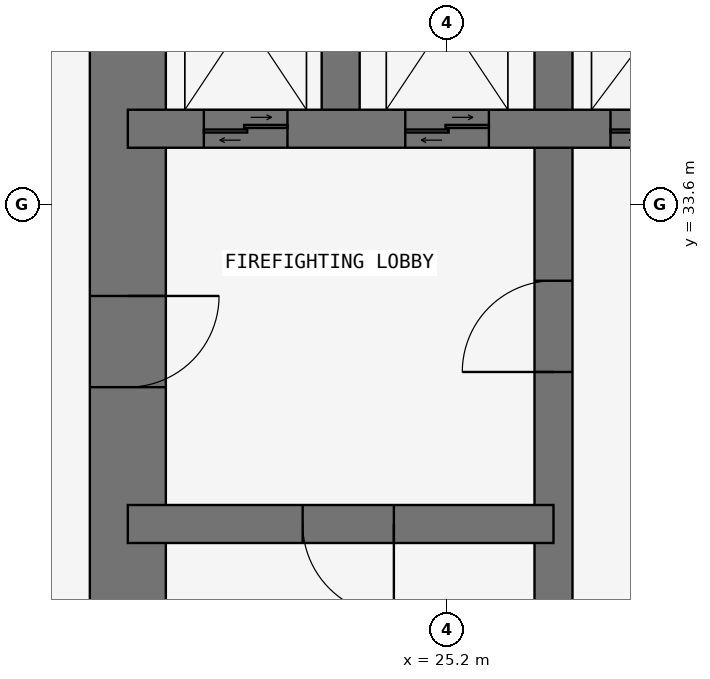
"""IFC4 building model, lengths in metres.
Left out: names, types, materials, properties, quantities, classifications, styles, units other than length and angle.
Written with IfcOpenShell. Run it as: python <this file> out.ifc"""

import sys

from ifc_helpers import new_model, si_unit, direction, frame, frame_2d, origin, place, context, subcontext, project, spatial, rectangle, extrude, element, fill, save


model = new_model("IFC4")
c1 = context("Model", 3, precision=1e-05, world=origin(), true_north=direction((0.0, 1.0)))
c2 = subcontext(c1, "Body", "Model", "MODEL_VIEW")
j1 = project(units=[si_unit("LENGTHUNIT", "METRE"), si_unit("PLANEANGLEUNIT", "RADIAN")], contexts=[c1])
p1 = place(None, origin())
s1 = spatial("IfcSite", under=j1, at=p1, CompositionType="ELEMENT")
p2 = place(p1, origin())
s2 = spatial("IfcBuilding", under=s1, at=p2, CompositionType="ELEMENT")
p3 = place(p2, frame((0.0, 0.0, 45.3)))
s3 = spatial("IfcBuildingStorey", under=s2, at=p3, CompositionType="ELEMENT", Elevation=45.3)
p4 = place(p3, frame((21.0, 37.8, 0.0), z_axis=(0.0, 0.0, 1.0), x_axis=(0.0, -1.0, 0.0)))
e1 = element("IfcWall", 1, at=p4, inside=s3, PredefinedType="SHEAR", context=c2, shape_type="SweptSolid", body=[
    extrude(rectangle(XDim=17.3, YDim=1.0, at=frame_2d((8.65, 0.0))), origin(), (0.0, 0.0, 1.0), 3.6),
])
p5 = place(p4, frame((5.4, 0.0, 0.0)))
e2 = element("IfcOpeningElement", 2, at=p5, cuts=e1, PredefinedType="OPENING", context=c2, shape_type="SweptSolid", body=[
    extrude(rectangle(XDim=1.2, YDim=2.1, at=frame_2d((0.6, 1.05))), frame((0.0, 0.51, 0.0), z_axis=(0.0, -1.0, 0.0), x_axis=(1.0, 0.0, 0.0)), (0.0, 0.0, 1.0), 1.02),
])
p6 = place(p3, frame((26.6, 21.0, 0.0), z_axis=(0.0, 0.0, 1.0), x_axis=(0.0, 1.0, 0.0)))
e3 = element("IfcWall", 3, at=p6, inside=s3, PredefinedType="SHEAR", context=c2, shape_type="SweptSolid", body=[
    extrude(rectangle(XDim=16.8, YDim=0.5, at=frame_2d((8.4, 0.0))), origin(), (0.0, 0.0, 1.0), 3.6),
])
p7 = place(p6, frame((10.4, 0.0, 0.0)))
e4 = element("IfcOpeningElement", 4, at=p7, cuts=e3, PredefinedType="OPENING", context=c2, shape_type="SweptSolid", body=[
    extrude(rectangle(XDim=1.2, YDim=2.1, at=frame_2d((0.6, 1.05))), frame((0.0, 0.26, 0.0), z_axis=(0.0, -1.0, 0.0), x_axis=(1.0, 0.0, 0.0)), (0.0, 0.0, 1.0), 0.52),
])
p8 = place(p3, frame((21.0, 29.4, 0.0), z_axis=(0.0, 0.0, 1.0), x_axis=(1.0, 0.0, 0.0)))
e5 = element("IfcWall", 5, at=p8, inside=s3, PredefinedType="SHEAR", context=c2, shape_type="SweptSolid", body=[
    extrude(rectangle(XDim=5.6, YDim=0.5, at=frame_2d((2.8, 0.0))), origin(), (0.0, 0.0, 1.0), 3.6),
])
p9 = place(p8, frame((2.3, 0.0, 0.0)))
e6 = element("IfcOpeningElement", 6, at=p9, cuts=e5, PredefinedType="OPENING", context=c2, shape_type="SweptSolid", body=[
    extrude(rectangle(XDim=1.2, YDim=2.1, at=frame_2d((0.6, 1.05))), frame((0.0, 0.26, 0.0), z_axis=(0.0, -1.0, 0.0), x_axis=(1.0, 0.0, 0.0)), (0.0, 0.0, 1.0), 0.52),
])
p10 = place(p3, frame((21.0, 34.6, 0.0), z_axis=(0.0, 0.0, 1.0), x_axis=(1.0, 0.0, 0.0)))
e7 = element("IfcWall", 7, at=p10, inside=s3, PredefinedType="SHEAR", context=c2, shape_type="SweptSolid", body=[
    extrude(rectangle(XDim=11.2, YDim=0.5, at=frame_2d((5.6, 0.0))), origin(), (0.0, 0.0, 1.0), 3.6),
])
p11 = place(p10, frame((9.35, 0.0, 0.0)))
e8 = element("IfcOpeningElement", 8, at=p11, cuts=e7, PredefinedType="OPENING", context=c2, shape_type="SweptSolid", body=[
    extrude(rectangle(XDim=0.9, YDim=2.1, at=frame_2d((0.45, 1.05))), frame((0.0, 0.26, 0.0), z_axis=(0.0, -1.0, 0.0), x_axis=(1.0, 0.0, 0.0)), (0.0, 0.0, 1.0), 0.52),
])
p12 = place(p10, frame((1.0, 0.0, 0.0)))
e9 = element("IfcOpeningElement", 9, at=p12, cuts=e7, PredefinedType="OPENING", context=c2, shape_type="SweptSolid", body=[
    extrude(rectangle(XDim=1.1, YDim=2.1, at=frame_2d((0.55, 1.05))), frame((0.0, 0.26, 0.0), z_axis=(0.0, -1.0, 0.0), x_axis=(1.0, 0.0, 0.0)), (0.0, 0.0, 1.0), 0.52),
])
p13 = place(p10, frame((3.65, 0.0, 0.0)))
e10 = element("IfcOpeningElement", 10, at=p13, cuts=e7, PredefinedType="OPENING", context=c2, shape_type="SweptSolid", body=[
    extrude(rectangle(XDim=1.1, YDim=2.1, at=frame_2d((0.55, 1.05))), frame((0.0, 0.26, 0.0), z_axis=(0.0, -1.0, 0.0), x_axis=(1.0, 0.0, 0.0)), (0.0, 0.0, 1.0), 0.52),
])
p14 = place(p10, frame((6.35, 0.0, 0.0)))
e11 = element("IfcOpeningElement", 11, at=p14, cuts=e7, PredefinedType="OPENING", context=c2, shape_type="SweptSolid", body=[
    extrude(rectangle(XDim=1.3, YDim=2.1, at=frame_2d((0.65, 1.05))), frame((0.0, 0.26, 0.0), z_axis=(0.0, -1.0, 0.0), x_axis=(1.0, 0.0, 0.0)), (0.0, 0.0, 1.0), 0.52),
])
p15 = place(p3, frame((23.8, 34.6, 0.0), z_axis=(0.0, 0.0, 1.0), x_axis=(0.0, 1.0, 0.0)))
e12 = element("IfcWall", 12, at=p15, inside=s3, PredefinedType="SHEAR", context=c2, shape_type="SweptSolid", body=[
    extrude(rectangle(XDim=3.2, YDim=0.5, at=frame_2d((1.6, 0.0))), origin(), (0.0, 0.0, 1.0), 3.6),
])
p16 = place(p5, origin())
e13 = element("IfcDoor", 13, at=p16, inside=s3, OperationType="SINGLE_SWING_LEFT", PredefinedType="DOOR", context=c2, shape_type="SweptSolid", body=[
    extrude(rectangle(XDim=1.2, YDim=2.1, at=frame_2d((0.6, 1.05))), frame((0.0, 0.025, 0.0), z_axis=(0.0, -1.0, 0.0), x_axis=(1.0, 0.0, 0.0)), (0.0, 0.0, 1.0), 0.05),
])
fill(e2, e13)
p17 = place(p9, frame((1.2, 0.0, 0.0), z_axis=(0.0, 0.0, 1.0), x_axis=(-1.0, 0.0, 0.0)))
e14 = element("IfcDoor", 14, at=p17, inside=s3, OperationType="SINGLE_SWING_LEFT", PredefinedType="DOOR", context=c2, shape_type="SweptSolid", body=[
    extrude(rectangle(XDim=1.2, YDim=2.1, at=frame_2d((0.6, 1.05))), frame((0.0, 0.025, 0.0), z_axis=(0.0, -1.0, 0.0), x_axis=(1.0, 0.0, 0.0)), (0.0, 0.0, 1.0), 0.05),
])
fill(e6, e14)
p18 = place(p7, origin())
e15 = element("IfcDoor", 15, at=p18, inside=s3, OperationType="SINGLE_SWING_LEFT", PredefinedType="DOOR", context=c2, shape_type="SweptSolid", body=[
    extrude(rectangle(XDim=1.2, YDim=2.1, at=frame_2d((0.6, 1.05))), frame((0.0, 0.025, 0.0), z_axis=(0.0, -1.0, 0.0), x_axis=(1.0, 0.0, 0.0)), (0.0, 0.0, 1.0), 0.05),
])
fill(e4, e15)
p19 = place(p12, origin())
e16 = element("IfcDoor", 16, at=p19, inside=s3, OperationType="DOUBLE_DOOR_SLIDING", PredefinedType="DOOR", context=c2, shape_type="SweptSolid", body=[
    extrude(rectangle(XDim=1.1, YDim=2.1, at=frame_2d((0.55, 1.05))), frame((0.0, 0.025, 0.0), z_axis=(0.0, -1.0, 0.0), x_axis=(1.0, 0.0, 0.0)), (0.0, 0.0, 1.0), 0.05),
])
fill(e9, e16)
p20 = place(p13, origin())
e17 = element("IfcDoor", 17, at=p20, inside=s3, OperationType="DOUBLE_DOOR_SLIDING", PredefinedType="DOOR", context=c2, shape_type="SweptSolid", body=[
    extrude(rectangle(XDim=1.1, YDim=2.1, at=frame_2d((0.55, 1.05))), frame((0.0, 0.025, 0.0), z_axis=(0.0, -1.0, 0.0), x_axis=(1.0, 0.0, 0.0)), (0.0, 0.0, 1.0), 0.05),
])
fill(e10, e17)
p21 = place(p14, origin())
e18 = element("IfcDoor", 18, at=p21, inside=s3, OperationType="DOUBLE_DOOR_SLIDING", PredefinedType="DOOR", context=c2, shape_type="SweptSolid", body=[
    extrude(rectangle(XDim=1.3, YDim=2.1, at=frame_2d((0.65, 1.05))), frame((0.0, 0.025, 0.0), z_axis=(0.0, -1.0, 0.0), x_axis=(1.0, 0.0, 0.0)), (0.0, 0.0, 1.0), 0.05),
])
fill(e11, e18)
save(model, sys.argv[1])
